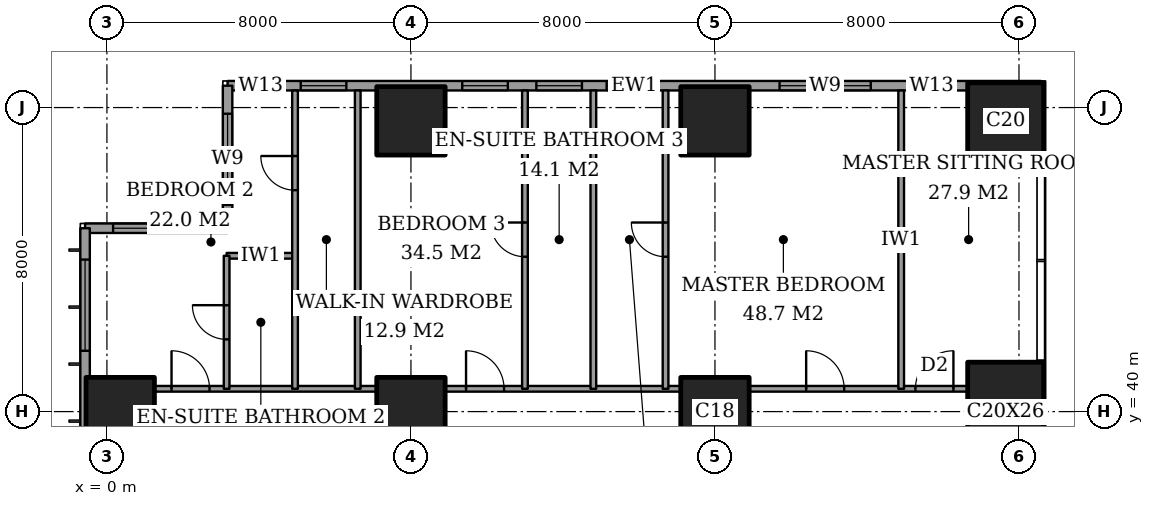
"""IFC4 building model, lengths in metres.
Left out: names, types, materials, properties, quantities, classifications, styles, units other than length and angle.
Written with IfcOpenShell. Run it as: python <this file> out.ifc"""

import sys

from ifc_helpers import new_model, si_unit, direction, frame, frame_2d, origin, origin_2d, place, context, subcontext, project, spatial, rectangle, extrude, element, fill, save


model = new_model("IFC4")
c1 = context("Model", 3, precision=1e-05, world=origin(), true_north=direction((0.0, 1.0)))
c2 = subcontext(c1, "Body", "Model", "MODEL_VIEW")
j1 = project(units=[si_unit("LENGTHUNIT", "METRE"), si_unit("PLANEANGLEUNIT", "RADIAN")], contexts=[c1])
p1 = place(None, origin())
s1 = spatial("IfcSite", under=j1, at=p1, CompositionType="ELEMENT")
p2 = place(p1, origin())
s2 = spatial("IfcBuilding", under=s1, at=p2, CompositionType="ELEMENT")
p3 = place(p2, frame((0.0, 0.0, 196.6)))
s3 = spatial("IfcBuildingStorey", under=s2, at=p3, CompositionType="ELEMENT", Elevation=196.6)
for number, where, z_axis, x_axis in (
    (1, (0.35, 40.0, 0.0), (0.0, 0.0, 1.0), (1.0, 0.0, 0.0)),
    (2, (8.0, 40.0, 0.0), (0.0, 0.0, 1.0), (1.0, 0.0, 0.0)),
    (3, (8.0, 47.65, 0.0), (0.0, 0.0, 1.0), (1.0, 0.0, 0.0)),
    (4, (16.0, 40.0, 0.0), (0.0, 0.0, 1.0), (1.0, 0.0, 0.0)),
    (5, (16.0, 47.65, 0.0), (0.0, 0.0, 1.0), (1.0, 0.0, 0.0)),
):
    element("IfcColumn", number, at=place(p3, frame(where, z_axis=z_axis, x_axis=x_axis)), inside=s3, PredefinedType="COLUMN", context=c2, shape_type="SweptSolid", body=[
        extrude(rectangle(XDim=1.8, YDim=1.8, at=origin_2d()), origin(), (0.0, 0.0, 1.0), 3.6),
    ])
p4 = place(p3, frame((23.65, 40.0, 0.0), z_axis=(0.0, 0.0, 1.0), x_axis=(1.0, 0.0, 0.0)))
e6 = element("IfcColumn", 6, at=p4, inside=s3, PredefinedType="COLUMN", context=c2, shape_type="SweptSolid", body=[
    extrude(rectangle(XDim=2.0, YDim=2.6, at=origin_2d()), origin(), (0.0, 0.0, 1.0), 3.6),
])
p5 = place(p3, frame((23.65, 47.65, 0.0), z_axis=(0.0, 0.0, 1.0), x_axis=(1.0, 0.0, 0.0)))
e7 = element("IfcColumn", 7, at=p5, inside=s3, PredefinedType="COLUMN", context=c2, shape_type="SweptSolid", body=[
    extrude(rectangle(XDim=2.0, YDim=2.0, at=origin_2d()), origin(), (0.0, 0.0, 1.0), 3.6),
])
p6 = place(p3, frame((24.575, 48.575, 0.0), z_axis=(0.0, 0.0, 1.0), x_axis=(-1.0, 0.0, 0.0)))
e8 = element("IfcWall", 8, at=p6, inside=s3, PredefinedType="SOLIDWALL", context=c2, shape_type="SweptSolid", body=[
    extrude(rectangle(XDim=21.4, YDim=0.25, at=frame_2d((10.7, 0.0))), origin(), (0.0, 0.0, 1.0), 3.6),
])
p7 = place(p6, frame((2.275, 0.0, 0.2)))
e9 = element("IfcOpeningElement", 9, at=p7, cuts=e8, PredefinedType="OPENING", context=c2, shape_type="SweptSolid", body=[
    extrude(rectangle(XDim=1.2, YDim=2.4, at=frame_2d((0.6, 1.2))), frame((0.0, 0.135, 0.0), z_axis=(0.0, -1.0, 0.0), x_axis=(1.0, 0.0, 0.0)), (0.0, 0.0, 1.0), 0.27),
])
p8 = place(p6, frame((4.475, 0.0, 0.2)))
e10 = element("IfcOpeningElement", 10, at=p8, cuts=e8, PredefinedType="OPENING", context=c2, shape_type="SweptSolid", body=[
    extrude(rectangle(XDim=2.4, YDim=2.4, at=frame_2d((1.2, 1.2))), frame((0.0, 0.135, 0.0), z_axis=(0.0, -1.0, 0.0), x_axis=(1.0, 0.0, 0.0)), (0.0, 0.0, 1.0), 0.27),
])
p9 = place(p6, frame((10.225, 0.0, 0.2)))
e11 = element("IfcOpeningElement", 11, at=p9, cuts=e8, PredefinedType="OPENING", context=c2, shape_type="SweptSolid", body=[
    extrude(rectangle(XDim=1.2, YDim=2.4, at=frame_2d((0.6, 1.2))), frame((0.0, 0.135, 0.0), z_axis=(0.0, -1.0, 0.0), x_axis=(1.0, 0.0, 0.0)), (0.0, 0.0, 1.0), 0.27),
])
p10 = place(p6, frame((12.075, 0.0, 0.2)))
e12 = element("IfcOpeningElement", 12, at=p10, cuts=e8, PredefinedType="OPENING", context=c2, shape_type="SweptSolid", body=[
    extrude(rectangle(XDim=1.2, YDim=2.4, at=frame_2d((0.6, 1.2))), frame((0.0, 0.135, 0.0), z_axis=(0.0, -1.0, 0.0), x_axis=(1.0, 0.0, 0.0)), (0.0, 0.0, 1.0), 0.27),
])
p11 = place(p6, frame((14.025, 0.0, 0.2)))
e13 = element("IfcOpeningElement", 13, at=p11, cuts=e8, PredefinedType="OPENING", context=c2, shape_type="SweptSolid", body=[
    extrude(rectangle(XDim=1.2, YDim=2.4, at=frame_2d((0.6, 1.2))), frame((0.0, 0.135, 0.0), z_axis=(0.0, -1.0, 0.0), x_axis=(1.0, 0.0, 0.0)), (0.0, 0.0, 1.0), 0.27),
])
p12 = place(p6, frame((18.275, 0.0, 0.2)))
e14 = element("IfcOpeningElement", 14, at=p12, cuts=e8, PredefinedType="OPENING", context=c2, shape_type="SweptSolid", body=[
    extrude(rectangle(XDim=1.2, YDim=2.4, at=frame_2d((0.6, 1.2))), frame((0.0, 0.135, 0.0), z_axis=(0.0, -1.0, 0.0), x_axis=(1.0, 0.0, 0.0)), (0.0, 0.0, 1.0), 0.27),
])
p13 = place(p6, frame((19.925, 0.0, 0.2)))
e15 = element("IfcOpeningElement", 15, at=p13, cuts=e8, PredefinedType="OPENING", context=c2, shape_type="SweptSolid", body=[
    extrude(rectangle(XDim=1.2, YDim=2.4, at=frame_2d((0.6, 1.2))), frame((0.0, 0.135, 0.0), z_axis=(0.0, -1.0, 0.0), x_axis=(1.0, 0.0, 0.0)), (0.0, 0.0, 1.0), 0.27),
])
p14 = place(p3, frame((3.175, 48.575, 0.0), z_axis=(0.0, 0.0, 1.0), x_axis=(0.0, -1.0, 0.0)))
e16 = element("IfcWall", 16, at=p14, inside=s3, PredefinedType="SOLIDWALL", context=c2, shape_type="SweptSolid", body=[
    extrude(rectangle(XDim=3.75, YDim=0.25, at=frame_2d((1.875, 0.0))), origin(), (0.0, 0.0, 1.0), 3.6),
])
p15 = place(p14, frame((0.738, 0.0, 0.2)))
e17 = element("IfcOpeningElement", 17, at=p15, cuts=e16, PredefinedType="OPENING", context=c2, shape_type="SweptSolid", body=[
    extrude(rectangle(XDim=2.4, YDim=2.4, at=frame_2d((1.2, 1.2))), frame((0.0, 0.135, 0.0), z_axis=(0.0, -1.0, 0.0), x_axis=(1.0, 0.0, 0.0)), (0.0, 0.0, 1.0), 0.27),
])
p16 = place(p3, frame((3.175, 44.825, 0.0), z_axis=(0.0, 0.0, 1.0), x_axis=(-1.0, 0.0, 0.0)))
e18 = element("IfcWall", 18, at=p16, inside=s3, PredefinedType="SOLIDWALL", context=c2, shape_type="SweptSolid", body=[
    extrude(rectangle(XDim=3.75, YDim=0.25, at=frame_2d((1.875, 0.0))), origin(), (0.0, 0.0, 1.0), 3.6),
])
p17 = place(p16, frame((0.613, 0.0, 0.2)))
e19 = element("IfcOpeningElement", 19, at=p17, cuts=e18, PredefinedType="OPENING", context=c2, shape_type="SweptSolid", body=[
    extrude(rectangle(XDim=2.4, YDim=2.4, at=frame_2d((1.2, 1.2))), frame((0.0, 0.135, 0.0), z_axis=(0.0, -1.0, 0.0), x_axis=(1.0, 0.0, 0.0)), (0.0, 0.0, 1.0), 0.27),
])
p18 = place(p3, frame((-0.575, 44.825, 0.0), z_axis=(0.0, 0.0, 1.0), x_axis=(0.0, -1.0, 0.0)))
e20 = element("IfcWall", 20, at=p18, inside=s3, PredefinedType="SOLIDWALL", context=c2, shape_type="SweptSolid", body=[
    extrude(rectangle(XDim=41.65, YDim=0.25, at=frame_2d((20.825, 0.0))), origin(), (0.0, 0.0, 1.0), 3.6),
])
p19 = place(p18, frame((0.825, 0.0, 0.2)))
e21 = element("IfcOpeningElement", 21, at=p19, cuts=e20, PredefinedType="OPENING", context=c2, shape_type="SweptSolid", body=[
    extrude(rectangle(XDim=2.4, YDim=2.4, at=frame_2d((1.2, 1.2))), frame((0.0, 0.135, 0.0), z_axis=(0.0, -1.0, 0.0), x_axis=(1.0, 0.0, 0.0)), (0.0, 0.0, 1.0), 0.27),
])
p20 = place(p18, frame((6.05, 0.0, 0.2)))
e22 = element("IfcOpeningElement", 22, at=p20, cuts=e20, PredefinedType="OPENING", context=c2, shape_type="SweptSolid", body=[
    extrude(rectangle(XDim=1.2, YDim=2.4, at=frame_2d((0.6, 1.2))), frame((0.0, 0.135, 0.0), z_axis=(0.0, -1.0, 0.0), x_axis=(1.0, 0.0, 0.0)), (0.0, 0.0, 1.0), 0.27),
])
p21 = place(p18, frame((8.225, 0.0, 0.2)))
e23 = element("IfcOpeningElement", 23, at=p21, cuts=e20, PredefinedType="OPENING", context=c2, shape_type="SweptSolid", body=[
    extrude(rectangle(XDim=2.4, YDim=2.4, at=frame_2d((1.2, 1.2))), frame((0.0, 0.135, 0.0), z_axis=(0.0, -1.0, 0.0), x_axis=(1.0, 0.0, 0.0)), (0.0, 0.0, 1.0), 0.27),
])
p22 = place(p18, frame((15.625, 0.0, 0.2)))
e24 = element("IfcOpeningElement", 24, at=p22, cuts=e20, PredefinedType="OPENING", context=c2, shape_type="SweptSolid", body=[
    extrude(rectangle(XDim=2.4, YDim=2.4, at=frame_2d((1.2, 1.2))), frame((0.0, 0.135, 0.0), z_axis=(0.0, -1.0, 0.0), x_axis=(1.0, 0.0, 0.0)), (0.0, 0.0, 1.0), 0.27),
])
p23 = place(p18, frame((23.625, 0.0, 0.2)))
e25 = element("IfcOpeningElement", 25, at=p23, cuts=e20, PredefinedType="OPENING", context=c2, shape_type="SweptSolid", body=[
    extrude(rectangle(XDim=2.4, YDim=2.4, at=frame_2d((1.2, 1.2))), frame((0.0, 0.135, 0.0), z_axis=(0.0, -1.0, 0.0), x_axis=(1.0, 0.0, 0.0)), (0.0, 0.0, 1.0), 0.27),
])
p24 = place(p18, frame((30.775, 0.0, 0.2)))
e26 = element("IfcOpeningElement", 26, at=p24, cuts=e20, PredefinedType="OPENING", context=c2, shape_type="SweptSolid", body=[
    extrude(rectangle(XDim=2.4, YDim=2.4, at=frame_2d((1.2, 1.2))), frame((0.0, 0.135, 0.0), z_axis=(0.0, -1.0, 0.0), x_axis=(1.0, 0.0, 0.0)), (0.0, 0.0, 1.0), 0.27),
])
p25 = place(p18, frame((34.55, 0.0, 0.2)))
e27 = element("IfcOpeningElement", 27, at=p25, cuts=e20, PredefinedType="OPENING", context=c2, shape_type="SweptSolid", body=[
    extrude(rectangle(XDim=1.2, YDim=2.4, at=frame_2d((0.6, 1.2))), frame((0.0, 0.135, 0.0), z_axis=(0.0, -1.0, 0.0), x_axis=(1.0, 0.0, 0.0)), (0.0, 0.0, 1.0), 0.27),
])
p26 = place(p18, frame((38.425, 0.0, 0.2)))
e28 = element("IfcOpeningElement", 28, at=p26, cuts=e20, PredefinedType="OPENING", context=c2, shape_type="SweptSolid", body=[
    extrude(rectangle(XDim=2.4, YDim=2.4, at=frame_2d((1.2, 1.2))), frame((0.0, 0.135, 0.0), z_axis=(0.0, -1.0, 0.0), x_axis=(1.0, 0.0, 0.0)), (0.0, 0.0, 1.0), 0.27),
])
p27 = place(p3, frame((1.25, 40.6, 0.0), z_axis=(0.0, 0.0, 1.0), x_axis=(1.0, 0.0, 0.0)))
e29 = element("IfcWall", 29, at=p27, inside=s3, PredefinedType="PARTITIONING", context=c2, shape_type="SweptSolid", body=[
    extrude(rectangle(XDim=5.85, YDim=0.15, at=frame_2d((2.925, 0.0))), origin(), (0.0, 0.0, 1.0), 3.35),
])
p28 = place(p27, frame((0.45, 0.0, 0.0)))
e30 = element("IfcOpeningElement", 30, at=p28, cuts=e29, PredefinedType="OPENING", context=c2, shape_type="SweptSolid", body=[
    extrude(rectangle(XDim=1.0, YDim=2.1, at=frame_2d((0.5, 1.05))), frame((0.0, 0.085, 0.0), z_axis=(0.0, -1.0, 0.0), x_axis=(1.0, 0.0, 0.0)), (0.0, 0.0, 1.0), 0.17),
])
p29 = place(p3, frame((8.9, 40.6, 0.0), z_axis=(0.0, 0.0, 1.0), x_axis=(1.0, 0.0, 0.0)))
e31 = element("IfcWall", 31, at=p29, inside=s3, PredefinedType="PARTITIONING", context=c2, shape_type="SweptSolid", body=[
    extrude(rectangle(XDim=6.2, YDim=0.15, at=frame_2d((3.1, 0.0))), origin(), (0.0, 0.0, 1.0), 3.35),
])
p30 = place(p29, frame((0.55, 0.0, 0.0)))
e32 = element("IfcOpeningElement", 32, at=p30, cuts=e31, PredefinedType="OPENING", context=c2, shape_type="SweptSolid", body=[
    extrude(rectangle(XDim=1.0, YDim=2.1, at=frame_2d((0.5, 1.05))), frame((0.0, 0.085, 0.0), z_axis=(0.0, -1.0, 0.0), x_axis=(1.0, 0.0, 0.0)), (0.0, 0.0, 1.0), 0.17),
])
p31 = place(p3, frame((16.9, 40.6, 0.0), z_axis=(0.0, 0.0, 1.0), x_axis=(1.0, 0.0, 0.0)))
e33 = element("IfcWall", 33, at=p31, inside=s3, PredefinedType="PARTITIONING", context=c2, shape_type="SweptSolid", body=[
    extrude(rectangle(XDim=5.75, YDim=0.15, at=frame_2d((2.875, 0.0))), origin(), (0.0, 0.0, 1.0), 3.35),
])
p32 = place(p31, frame((1.5, 0.0, 0.0)))
e34 = element("IfcOpeningElement", 34, at=p32, cuts=e33, PredefinedType="OPENING", context=c2, shape_type="SweptSolid", body=[
    extrude(rectangle(XDim=1.0, YDim=2.1, at=frame_2d((0.5, 1.05))), frame((0.0, 0.085, 0.0), z_axis=(0.0, -1.0, 0.0), x_axis=(1.0, 0.0, 0.0)), (0.0, 0.0, 1.0), 0.17),
])
p33 = place(p31, frame((4.375, 0.0, 0.0)))
e35 = element("IfcOpeningElement", 35, at=p33, cuts=e33, PredefinedType="OPENING", context=c2, shape_type="SweptSolid", body=[
    extrude(rectangle(XDim=1.0, YDim=2.1, at=frame_2d((0.5, 1.05))), frame((0.0, 0.085, 0.0), z_axis=(0.0, -1.0, 0.0), x_axis=(1.0, 0.0, 0.0)), (0.0, 0.0, 1.0), 0.17),
])
p34 = place(p3, frame((3.15, 44.1, 0.0), z_axis=(0.0, 0.0, 1.0), x_axis=(1.0, 0.0, 0.0)))
e36 = element("IfcWall", 36, at=p34, inside=s3, PredefinedType="PARTITIONING", context=c2, shape_type="SweptSolid", body=[
    extrude(rectangle(XDim=1.8, YDim=0.15, at=frame_2d((0.9, 0.0))), origin(), (0.0, 0.0, 1.0), 3.35),
])
p35 = place(p3, frame((3.15, 40.6, 0.0), z_axis=(0.0, 0.0, 1.0), x_axis=(0.0, 1.0, 0.0)))
e37 = element("IfcWall", 37, at=p35, inside=s3, PredefinedType="PARTITIONING", context=c2, shape_type="SweptSolid", body=[
    extrude(rectangle(XDim=3.5, YDim=0.15, at=frame_2d((1.75, 0.0))), origin(), (0.0, 0.0, 1.0), 3.35),
])
p36 = place(p35, frame((1.3, 0.0, 0.0)))
e38 = element("IfcOpeningElement", 38, at=p36, cuts=e37, PredefinedType="OPENING", context=c2, shape_type="SweptSolid", body=[
    extrude(rectangle(XDim=0.9, YDim=2.1, at=frame_2d((0.45, 1.05))), frame((0.0, 0.085, 0.0), z_axis=(0.0, -1.0, 0.0), x_axis=(1.0, 0.0, 0.0)), (0.0, 0.0, 1.0), 0.17),
])
p37 = place(p3, frame((4.95, 40.6, 0.0), z_axis=(0.0, 0.0, 1.0), x_axis=(0.0, 1.0, 0.0)))
e39 = element("IfcWall", 39, at=p37, inside=s3, PredefinedType="PARTITIONING", context=c2, shape_type="SweptSolid", body=[
    extrude(rectangle(XDim=7.85, YDim=0.15, at=frame_2d((3.925, 0.0))), origin(), (0.0, 0.0, 1.0), 3.35),
])
p38 = place(p37, frame((5.225, 0.0, 0.0)))
e40 = element("IfcOpeningElement", 40, at=p38, cuts=e39, PredefinedType="OPENING", context=c2, shape_type="SweptSolid", body=[
    extrude(rectangle(XDim=0.9, YDim=2.1, at=frame_2d((0.45, 1.05))), frame((0.0, 0.085, 0.0), z_axis=(0.0, -1.0, 0.0), x_axis=(1.0, 0.0, 0.0)), (0.0, 0.0, 1.0), 0.17),
])
p39 = place(p3, frame((6.6, 40.6, 0.0), z_axis=(0.0, 0.0, 1.0), x_axis=(0.0, 1.0, 0.0)))
e41 = element("IfcWall", 41, at=p39, inside=s3, PredefinedType="PARTITIONING", context=c2, shape_type="SweptSolid", body=[
    extrude(rectangle(XDim=7.85, YDim=0.15, at=frame_2d((3.925, 0.0))), origin(), (0.0, 0.0, 1.0), 3.35),
])
p40 = place(p3, frame((11.0, 40.6, 0.0), z_axis=(0.0, 0.0, 1.0), x_axis=(0.0, 1.0, 0.0)))
e42 = element("IfcWall", 42, at=p40, inside=s3, PredefinedType="PARTITIONING", context=c2, shape_type="SweptSolid", body=[
    extrude(rectangle(XDim=7.85, YDim=0.15, at=frame_2d((3.925, 0.0))), origin(), (0.0, 0.0, 1.0), 3.35),
])
p41 = place(p40, frame((3.475, 0.0, 0.0)))
e43 = element("IfcOpeningElement", 43, at=p41, cuts=e42, PredefinedType="OPENING", context=c2, shape_type="SweptSolid", body=[
    extrude(rectangle(XDim=0.9, YDim=2.1, at=frame_2d((0.45, 1.05))), frame((0.0, 0.085, 0.0), z_axis=(0.0, -1.0, 0.0), x_axis=(1.0, 0.0, 0.0)), (0.0, 0.0, 1.0), 0.17),
])
p42 = place(p3, frame((12.8, 40.6, 0.0), z_axis=(0.0, 0.0, 1.0), x_axis=(0.0, 1.0, 0.0)))
e44 = element("IfcWall", 44, at=p42, inside=s3, PredefinedType="PARTITIONING", context=c2, shape_type="SweptSolid", body=[
    extrude(rectangle(XDim=7.85, YDim=0.15, at=frame_2d((3.925, 0.0))), origin(), (0.0, 0.0, 1.0), 3.35),
])
p43 = place(p3, frame((14.7, 40.6, 0.0), z_axis=(0.0, 0.0, 1.0), x_axis=(0.0, 1.0, 0.0)))
e45 = element("IfcWall", 45, at=p43, inside=s3, PredefinedType="PARTITIONING", context=c2, shape_type="SweptSolid", body=[
    extrude(rectangle(XDim=7.85, YDim=0.15, at=frame_2d((3.925, 0.0))), origin(), (0.0, 0.0, 1.0), 3.35),
])
p44 = place(p43, frame((3.475, 0.0, 0.0)))
e46 = element("IfcOpeningElement", 46, at=p44, cuts=e45, PredefinedType="OPENING", context=c2, shape_type="SweptSolid", body=[
    extrude(rectangle(XDim=0.9, YDim=2.1, at=frame_2d((0.45, 1.05))), frame((0.0, 0.085, 0.0), z_axis=(0.0, -1.0, 0.0), x_axis=(1.0, 0.0, 0.0)), (0.0, 0.0, 1.0), 0.17),
])
p45 = place(p3, frame((20.9, 40.6, 0.0), z_axis=(0.0, 0.0, 1.0), x_axis=(0.0, 1.0, 0.0)))
e47 = element("IfcWall", 47, at=p45, inside=s3, PredefinedType="PARTITIONING", context=c2, shape_type="SweptSolid", body=[
    extrude(rectangle(XDim=7.85, YDim=0.15, at=frame_2d((3.925, 0.0))), origin(), (0.0, 0.0, 1.0), 3.35),
])
p46 = place(p7, origin())
e48 = element("IfcWindow", 48, at=p46, inside=s3, PartitioningType="SINGLE_PANEL", PredefinedType="WINDOW", context=c2, shape_type="SweptSolid", body=[
    extrude(rectangle(XDim=1.2, YDim=2.4, at=frame_2d((0.6, 1.2))), frame((0.0, 0.03, 0.0), z_axis=(0.0, -1.0, 0.0), x_axis=(1.0, 0.0, 0.0)), (0.0, 0.0, 1.0), 0.06),
])
fill(e9, e48)
p47 = place(p8, origin())
e49 = element("IfcWindow", 49, at=p47, inside=s3, PartitioningType="SINGLE_PANEL", PredefinedType="WINDOW", context=c2, shape_type="SweptSolid", body=[
    extrude(rectangle(XDim=2.4, YDim=2.4, at=frame_2d((1.2, 1.2))), frame((0.0, 0.03, 0.0), z_axis=(0.0, -1.0, 0.0), x_axis=(1.0, 0.0, 0.0)), (0.0, 0.0, 1.0), 0.06),
])
fill(e10, e49)
p48 = place(p9, origin())
e50 = element("IfcWindow", 50, at=p48, inside=s3, PartitioningType="SINGLE_PANEL", PredefinedType="WINDOW", context=c2, shape_type="SweptSolid", body=[
    extrude(rectangle(XDim=1.2, YDim=2.4, at=frame_2d((0.6, 1.2))), frame((0.0, 0.03, 0.0), z_axis=(0.0, -1.0, 0.0), x_axis=(1.0, 0.0, 0.0)), (0.0, 0.0, 1.0), 0.06),
])
fill(e11, e50)
p49 = place(p10, origin())
e51 = element("IfcWindow", 51, at=p49, inside=s3, PartitioningType="SINGLE_PANEL", PredefinedType="WINDOW", context=c2, shape_type="SweptSolid", body=[
    extrude(rectangle(XDim=1.2, YDim=2.4, at=frame_2d((0.6, 1.2))), frame((0.0, 0.03, 0.0), z_axis=(0.0, -1.0, 0.0), x_axis=(1.0, 0.0, 0.0)), (0.0, 0.0, 1.0), 0.06),
])
fill(e12, e51)
p50 = place(p11, origin())
e52 = element("IfcWindow", 52, at=p50, inside=s3, PartitioningType="SINGLE_PANEL", PredefinedType="WINDOW", context=c2, shape_type="SweptSolid", body=[
    extrude(rectangle(XDim=1.2, YDim=2.4, at=frame_2d((0.6, 1.2))), frame((0.0, 0.03, 0.0), z_axis=(0.0, -1.0, 0.0), x_axis=(1.0, 0.0, 0.0)), (0.0, 0.0, 1.0), 0.06),
])
fill(e13, e52)
p51 = place(p12, origin())
e53 = element("IfcWindow", 53, at=p51, inside=s3, PartitioningType="SINGLE_PANEL", PredefinedType="WINDOW", context=c2, shape_type="SweptSolid", body=[
    extrude(rectangle(XDim=1.2, YDim=2.4, at=frame_2d((0.6, 1.2))), frame((0.0, 0.03, 0.0), z_axis=(0.0, -1.0, 0.0), x_axis=(1.0, 0.0, 0.0)), (0.0, 0.0, 1.0), 0.06),
])
fill(e14, e53)
p52 = place(p13, origin())
e54 = element("IfcWindow", 54, at=p52, inside=s3, PartitioningType="SINGLE_PANEL", PredefinedType="WINDOW", context=c2, shape_type="SweptSolid", body=[
    extrude(rectangle(XDim=1.2, YDim=2.4, at=frame_2d((0.6, 1.2))), frame((0.0, 0.03, 0.0), z_axis=(0.0, -1.0, 0.0), x_axis=(1.0, 0.0, 0.0)), (0.0, 0.0, 1.0), 0.06),
])
fill(e15, e54)
p53 = place(p15, origin())
e55 = element("IfcWindow", 55, at=p53, inside=s3, PartitioningType="SINGLE_PANEL", PredefinedType="WINDOW", context=c2, shape_type="SweptSolid", body=[
    extrude(rectangle(XDim=2.4, YDim=2.4, at=frame_2d((1.2, 1.2))), frame((0.0, 0.03, 0.0), z_axis=(0.0, -1.0, 0.0), x_axis=(1.0, 0.0, 0.0)), (0.0, 0.0, 1.0), 0.06),
])
fill(e17, e55)
p54 = place(p17, origin())
e56 = element("IfcWindow", 56, at=p54, inside=s3, PartitioningType="SINGLE_PANEL", PredefinedType="WINDOW", context=c2, shape_type="SweptSolid", body=[
    extrude(rectangle(XDim=2.4, YDim=2.4, at=frame_2d((1.2, 1.2))), frame((0.0, 0.03, 0.0), z_axis=(0.0, -1.0, 0.0), x_axis=(1.0, 0.0, 0.0)), (0.0, 0.0, 1.0), 0.06),
])
fill(e19, e56)
p55 = place(p19, origin())
e57 = element("IfcWindow", 57, at=p55, inside=s3, PartitioningType="SINGLE_PANEL", PredefinedType="WINDOW", context=c2, shape_type="SweptSolid", body=[
    extrude(rectangle(XDim=2.4, YDim=2.4, at=frame_2d((1.2, 1.2))), frame((0.0, 0.03, 0.0), z_axis=(0.0, -1.0, 0.0), x_axis=(1.0, 0.0, 0.0)), (0.0, 0.0, 1.0), 0.06),
])
fill(e21, e57)
p56 = place(p36, origin())
e58 = element("IfcDoor", 58, at=p56, inside=s3, OperationType="SINGLE_SWING_LEFT", PredefinedType="DOOR", context=c2, shape_type="SweptSolid", body=[
    extrude(rectangle(XDim=0.9, YDim=2.1, at=frame_2d((0.45, 1.05))), frame((0.0, 0.025, 0.0), z_axis=(0.0, -1.0, 0.0), x_axis=(1.0, 0.0, 0.0)), (0.0, 0.0, 1.0), 0.05),
])
fill(e38, e58)
p57 = place(p28, origin())
e59 = element("IfcDoor", 59, at=p57, inside=s3, OperationType="SINGLE_SWING_RIGHT", PredefinedType="DOOR", context=c2, shape_type="SweptSolid", body=[
    extrude(rectangle(XDim=1.0, YDim=2.1, at=frame_2d((0.5, 1.05))), frame((0.0, 0.025, 0.0), z_axis=(0.0, -1.0, 0.0), x_axis=(1.0, 0.0, 0.0)), (0.0, 0.0, 1.0), 0.05),
])
fill(e30, e59)
p58 = place(p38, origin())
e60 = element("IfcDoor", 60, at=p58, inside=s3, OperationType="SINGLE_SWING_LEFT", PredefinedType="DOOR", context=c2, shape_type="SweptSolid", body=[
    extrude(rectangle(XDim=0.9, YDim=2.1, at=frame_2d((0.45, 1.05))), frame((0.0, 0.025, 0.0), z_axis=(0.0, -1.0, 0.0), x_axis=(1.0, 0.0, 0.0)), (0.0, 0.0, 1.0), 0.05),
])
fill(e40, e60)
p59 = place(p30, origin())
e61 = element("IfcDoor", 61, at=p59, inside=s3, OperationType="SINGLE_SWING_RIGHT", PredefinedType="DOOR", context=c2, shape_type="SweptSolid", body=[
    extrude(rectangle(XDim=1.0, YDim=2.1, at=frame_2d((0.5, 1.05))), frame((0.0, 0.025, 0.0), z_axis=(0.0, -1.0, 0.0), x_axis=(1.0, 0.0, 0.0)), (0.0, 0.0, 1.0), 0.05),
])
fill(e32, e61)
p60 = place(p41, origin())
e62 = element("IfcDoor", 62, at=p60, inside=s3, OperationType="SINGLE_SWING_LEFT", PredefinedType="DOOR", context=c2, shape_type="SweptSolid", body=[
    extrude(rectangle(XDim=0.9, YDim=2.1, at=frame_2d((0.45, 1.05))), frame((0.0, 0.025, 0.0), z_axis=(0.0, -1.0, 0.0), x_axis=(1.0, 0.0, 0.0)), (0.0, 0.0, 1.0), 0.05),
])
fill(e43, e62)
p61 = place(p44, origin())
e63 = element("IfcDoor", 63, at=p61, inside=s3, OperationType="SINGLE_SWING_LEFT", PredefinedType="DOOR", context=c2, shape_type="SweptSolid", body=[
    extrude(rectangle(XDim=0.9, YDim=2.1, at=frame_2d((0.45, 1.05))), frame((0.0, 0.025, 0.0), z_axis=(0.0, -1.0, 0.0), x_axis=(1.0, 0.0, 0.0)), (0.0, 0.0, 1.0), 0.05),
])
fill(e46, e63)
p62 = place(p32, origin())
e64 = element("IfcDoor", 64, at=p62, inside=s3, OperationType="SINGLE_SWING_RIGHT", PredefinedType="DOOR", context=c2, shape_type="SweptSolid", body=[
    extrude(rectangle(XDim=1.0, YDim=2.1, at=frame_2d((0.5, 1.05))), frame((0.0, 0.025, 0.0), z_axis=(0.0, -1.0, 0.0), x_axis=(1.0, 0.0, 0.0)), (0.0, 0.0, 1.0), 0.05),
])
fill(e34, e64)
p63 = place(p33, origin())
e65 = element("IfcDoor", 65, at=p63, inside=s3, OperationType="SINGLE_SWING_LEFT", PredefinedType="DOOR", context=c2, shape_type="SweptSolid", body=[
    extrude(rectangle(XDim=1.0, YDim=2.1, at=frame_2d((0.5, 1.05))), frame((0.0, 0.025, 0.0), z_axis=(0.0, -1.0, 0.0), x_axis=(1.0, 0.0, 0.0)), (0.0, 0.0, 1.0), 0.05),
])
fill(e35, e65)
save(model, sys.argv[1])
